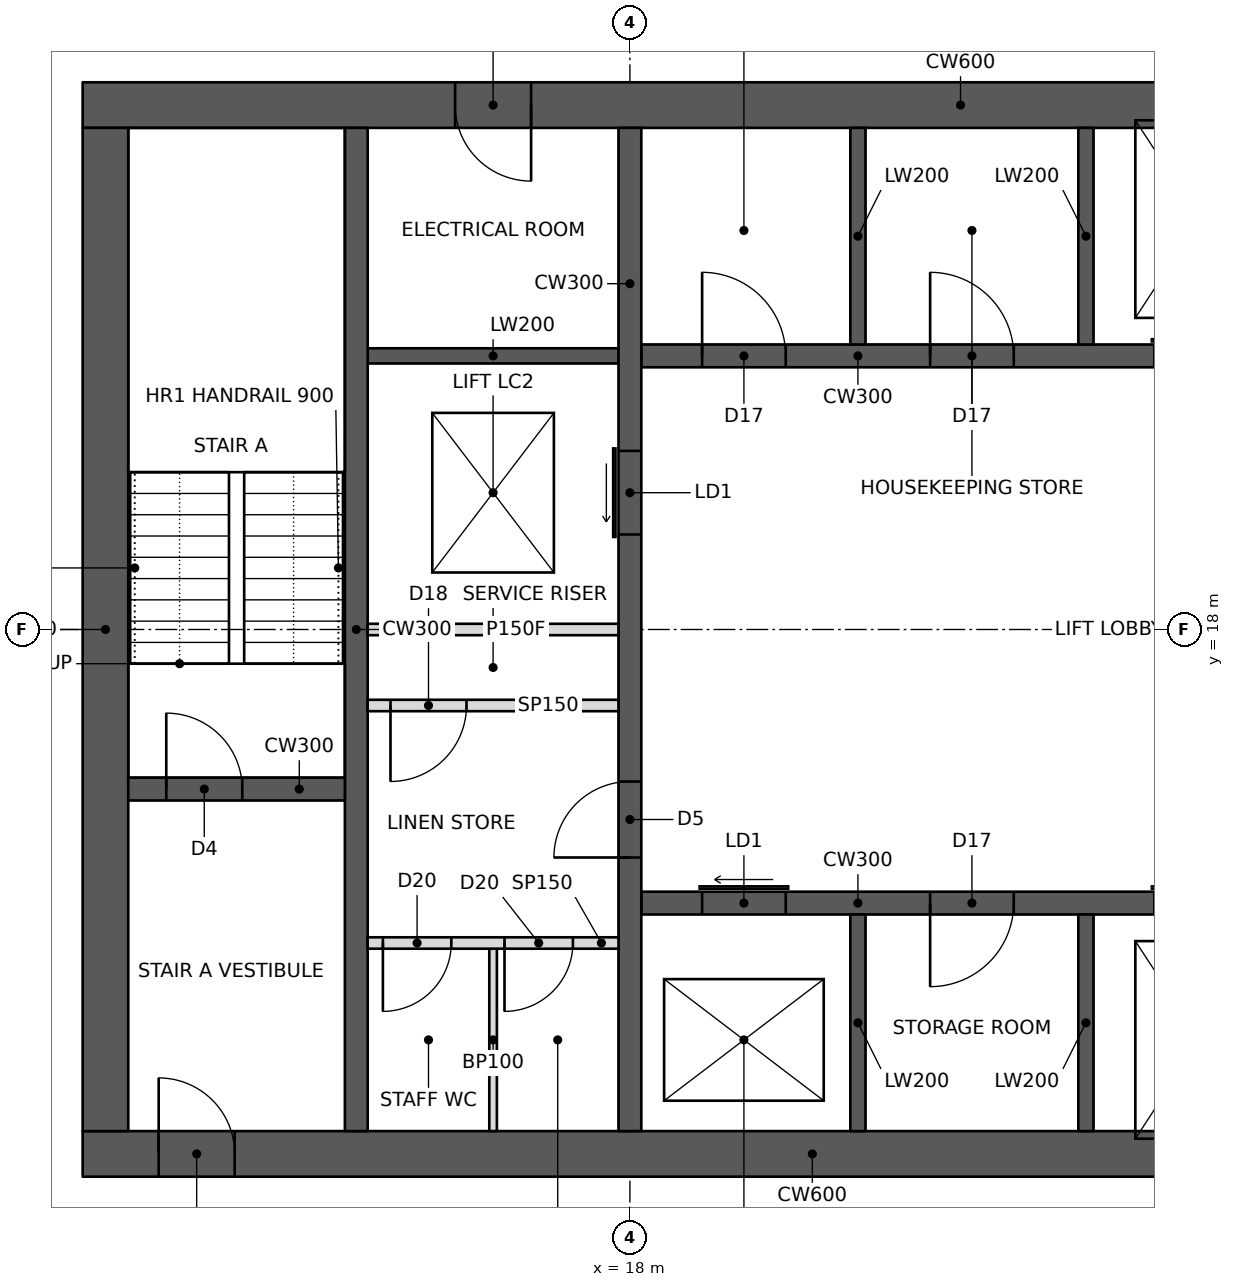
"""IFC4 building model, lengths in metres.
Left out: names, types, materials, properties, quantities, classifications, styles, units other than length and angle.
Written with IfcOpenShell. Run it as: python <this file> out.ifc"""

import sys

from ifc_helpers import new_model, si_unit, direction, frame, frame_2d, origin, place, context, subcontext, project, spatial, rectangle, extrude, element, fill, save


model = new_model("IFC4")
c1 = context("Model", 3, precision=1e-05, world=origin(), true_north=direction((0.0, 1.0)))
c2 = subcontext(c1, "Body", "Model", "MODEL_VIEW")
j1 = project(units=[si_unit("LENGTHUNIT", "METRE"), si_unit("PLANEANGLEUNIT", "RADIAN")], contexts=[c1])
p1 = place(None, origin())
s1 = spatial("IfcSite", under=j1, at=p1, CompositionType="ELEMENT")
p2 = place(p1, origin())
s2 = spatial("IfcBuilding", under=s1, at=p2, CompositionType="ELEMENT")
p3 = place(p2, frame((0.0, 0.0, 208.0)))
s3 = spatial("IfcBuildingStorey", under=s2, at=p3, CompositionType="ELEMENT", Elevation=208.0)
p4 = place(p3, frame((10.8, 11.1, 0.0), z_axis=(0.0, 0.0, 1.0), x_axis=(1.0, 0.0, 0.0)))
e1 = element("IfcWall", 1, at=p4, inside=s3, PredefinedType="SHEAR", context=c2, shape_type="SweptSolid", body=[
    extrude(rectangle(XDim=23.4, YDim=0.6, at=frame_2d((11.7, 0.0))), origin(), (0.0, 0.0, 1.0), 3.4),
])
p5 = place(p4, frame((1.0, 0.0, 0.0)))
e2 = element("IfcOpeningElement", 2, at=p5, cuts=e1, PredefinedType="OPENING", context=c2, shape_type="SweptSolid", body=[
    extrude(rectangle(XDim=1.0, YDim=2.1, at=frame_2d((0.5, 1.05))), frame((0.0, 0.31, 0.0), z_axis=(0.0, -1.0, 0.0), x_axis=(1.0, 0.0, 0.0)), (0.0, 0.0, 1.0), 0.62),
])
p6 = place(p4, frame((17.2, 0.0, 0.0)))
e3 = element("IfcOpeningElement", 3, at=p6, cuts=e1, PredefinedType="OPENING", context=c2, shape_type="SweptSolid", body=[
    extrude(rectangle(XDim=1.8, YDim=2.1, at=frame_2d((0.9, 1.05))), frame((0.0, 0.31, 0.0), z_axis=(0.0, -1.0, 0.0), x_axis=(1.0, 0.0, 0.0)), (0.0, 0.0, 1.0), 0.62),
])
p7 = place(p3, frame((10.8, 24.9, 0.0), z_axis=(0.0, 0.0, 1.0), x_axis=(1.0, 0.0, 0.0)))
e4 = element("IfcWall", 4, at=p7, inside=s3, PredefinedType="SHEAR", context=c2, shape_type="SweptSolid", body=[
    extrude(rectangle(XDim=23.4, YDim=0.6, at=frame_2d((11.7, 0.0))), origin(), (0.0, 0.0, 1.0), 3.4),
])
p8 = place(p7, frame((17.2, 0.0, 0.0)))
e5 = element("IfcOpeningElement", 5, at=p8, cuts=e4, PredefinedType="OPENING", context=c2, shape_type="SweptSolid", body=[
    extrude(rectangle(XDim=1.8, YDim=2.1, at=frame_2d((0.9, 1.05))), frame((0.0, 0.31, 0.0), z_axis=(0.0, -1.0, 0.0), x_axis=(1.0, 0.0, 0.0)), (0.0, 0.0, 1.0), 0.62),
])
p9 = place(p7, frame((21.1, 0.0, 0.0)))
e6 = element("IfcOpeningElement", 6, at=p9, cuts=e4, PredefinedType="OPENING", context=c2, shape_type="SweptSolid", body=[
    extrude(rectangle(XDim=1.0, YDim=2.1, at=frame_2d((0.5, 1.05))), frame((0.0, 0.31, 0.0), z_axis=(0.0, -1.0, 0.0), x_axis=(1.0, 0.0, 0.0)), (0.0, 0.0, 1.0), 0.62),
])
p10 = place(p7, frame((4.9, 0.0, 0.0)))
e7 = element("IfcOpeningElement", 7, at=p10, cuts=e4, PredefinedType="OPENING", context=c2, shape_type="SweptSolid", body=[
    extrude(rectangle(XDim=1.0, YDim=2.1, at=frame_2d((0.5, 1.05))), frame((0.0, 0.31, 0.0), z_axis=(0.0, -1.0, 0.0), x_axis=(1.0, 0.0, 0.0)), (0.0, 0.0, 1.0), 0.62),
])
p11 = place(p3, frame((11.1, 11.4, 0.0), z_axis=(0.0, 0.0, 1.0), x_axis=(0.0, 1.0, 0.0)))
e8 = element("IfcWall", 8, at=p11, inside=s3, PredefinedType="SHEAR", context=c2, shape_type="SweptSolid", body=[
    extrude(rectangle(XDim=13.2, YDim=0.6, at=frame_2d((6.6, 0.0))), origin(), (0.0, 0.0, 1.0), 3.4),
])
p12 = place(p3, frame((14.4, 11.4, 0.0), z_axis=(0.0, 0.0, 1.0), x_axis=(0.0, 1.0, 0.0)))
e9 = element("IfcWall", 9, at=p12, inside=s3, PredefinedType="SHEAR", context=c2, shape_type="SweptSolid", body=[
    extrude(rectangle(XDim=13.2, YDim=0.3, at=frame_2d((6.6, 0.0))), origin(), (0.0, 0.0, 1.0), 3.4),
])
p13 = place(p3, frame((11.4, 15.9, 0.0), z_axis=(0.0, 0.0, 1.0), x_axis=(1.0, 0.0, 0.0)))
e10 = element("IfcWall", 10, at=p13, inside=s3, PredefinedType="SHEAR", context=c2, shape_type="SweptSolid", body=[
    extrude(rectangle(XDim=2.85, YDim=0.3, at=frame_2d((1.425, 0.0))), origin(), (0.0, 0.0, 1.0), 3.4),
])
p14 = place(p13, frame((0.5, 0.0, 0.0)))
e11 = element("IfcOpeningElement", 11, at=p14, cuts=e10, PredefinedType="OPENING", context=c2, shape_type="SweptSolid", body=[
    extrude(rectangle(XDim=1.0, YDim=2.1, at=frame_2d((0.5, 1.05))), frame((0.0, 0.16, 0.0), z_axis=(0.0, -1.0, 0.0), x_axis=(1.0, 0.0, 0.0)), (0.0, 0.0, 1.0), 0.32),
])
p15 = place(p3, frame((18.0, 11.4, 0.0), z_axis=(0.0, 0.0, 1.0), x_axis=(0.0, 1.0, 0.0)))
e12 = element("IfcWall", 12, at=p15, inside=s3, PredefinedType="SHEAR", context=c2, shape_type="SweptSolid", body=[
    extrude(rectangle(XDim=13.2, YDim=0.3, at=frame_2d((6.6, 0.0))), origin(), (0.0, 0.0, 1.0), 3.4),
])
p16 = place(p15, frame((3.6, 0.0, 0.0)))
e13 = element("IfcOpeningElement", 13, at=p16, cuts=e12, PredefinedType="OPENING", context=c2, shape_type="SweptSolid", body=[
    extrude(rectangle(XDim=1.0, YDim=2.1, at=frame_2d((0.5, 1.05))), frame((0.0, 0.16, 0.0), z_axis=(0.0, -1.0, 0.0), x_axis=(1.0, 0.0, 0.0)), (0.0, 0.0, 1.0), 0.32),
])
p17 = place(p15, frame((7.85, 0.0, 0.0)))
e14 = element("IfcOpeningElement", 14, at=p17, cuts=e12, PredefinedType="OPENING", context=c2, shape_type="SweptSolid", body=[
    extrude(rectangle(XDim=1.1, YDim=2.1, at=frame_2d((0.55, 1.05))), frame((0.0, 0.16, 0.0), z_axis=(0.0, -1.0, 0.0), x_axis=(1.0, 0.0, 0.0)), (0.0, 0.0, 1.0), 0.32),
])
p18 = place(p3, frame((14.55, 18.0, 0.0), z_axis=(0.0, 0.0, 1.0), x_axis=(1.0, 0.0, 0.0)))
e15 = element("IfcWall", 15, at=p18, inside=s3, PredefinedType="PARTITIONING", context=c2, shape_type="SweptSolid", body=[
    extrude(rectangle(XDim=3.3, YDim=0.15, at=frame_2d((1.65, 0.0))), origin(), (0.0, 0.0, 1.0), 3.2),
])
p19 = place(p3, frame((18.15, 14.4, 0.0), z_axis=(0.0, 0.0, 1.0), x_axis=(1.0, 0.0, 0.0)))
e16 = element("IfcWall", 16, at=p19, inside=s3, PredefinedType="SHEAR", context=c2, shape_type="SweptSolid", body=[
    extrude(rectangle(XDim=9.0, YDim=0.3, at=frame_2d((4.5, 0.0))), origin(), (0.0, 0.0, 1.0), 3.4),
])
p20 = place(p19, frame((0.8, 0.0, 0.0)))
e17 = element("IfcOpeningElement", 17, at=p20, cuts=e16, PredefinedType="OPENING", context=c2, shape_type="SweptSolid", body=[
    extrude(rectangle(XDim=1.1, YDim=2.1, at=frame_2d((0.55, 1.05))), frame((0.0, 0.16, 0.0), z_axis=(0.0, -1.0, 0.0), x_axis=(1.0, 0.0, 0.0)), (0.0, 0.0, 1.0), 0.32),
])
p21 = place(p19, frame((6.75, 0.0, 0.0)))
e18 = element("IfcOpeningElement", 18, at=p21, cuts=e16, PredefinedType="OPENING", context=c2, shape_type="SweptSolid", body=[
    extrude(rectangle(XDim=1.2, YDim=2.1, at=frame_2d((0.6, 1.05))), frame((0.0, 0.16, 0.0), z_axis=(0.0, -1.0, 0.0), x_axis=(1.0, 0.0, 0.0)), (0.0, 0.0, 1.0), 0.32),
])
p22 = place(p19, frame((3.8, 0.0, 0.0)))
e19 = element("IfcOpeningElement", 19, at=p22, cuts=e16, PredefinedType="OPENING", context=c2, shape_type="SweptSolid", body=[
    extrude(rectangle(XDim=1.1, YDim=2.1, at=frame_2d((0.55, 1.05))), frame((0.0, 0.16, 0.0), z_axis=(0.0, -1.0, 0.0), x_axis=(1.0, 0.0, 0.0)), (0.0, 0.0, 1.0), 0.32),
])
for number, where, z_axis, x_axis in (
    (20, (21.0, 11.4, 0.0), (0.0, 0.0, 1.0), (0.0, 1.0, 0.0)),
    (21, (24.0, 11.4, 0.0), (0.0, 0.0, 1.0), (0.0, 1.0, 0.0)),
):
    element("IfcWall", number, at=place(p3, frame(where, z_axis=z_axis, x_axis=x_axis)), inside=s3, PredefinedType="SHEAR", context=c2, shape_type="SweptSolid", body=[
        extrude(rectangle(XDim=2.85, YDim=0.2, at=frame_2d((1.425, 0.0))), origin(), (0.0, 0.0, 1.0), 3.4),
    ])
p23 = place(p3, frame((18.15, 21.6, 0.0), z_axis=(0.0, 0.0, 1.0), x_axis=(1.0, 0.0, 0.0)))
e22 = element("IfcWall", 22, at=p23, inside=s3, PredefinedType="SHEAR", context=c2, shape_type="SweptSolid", body=[
    extrude(rectangle(XDim=9.0, YDim=0.3, at=frame_2d((4.5, 0.0))), origin(), (0.0, 0.0, 1.0), 3.4),
])
p24 = place(p23, frame((6.75, 0.0, 0.0)))
e23 = element("IfcOpeningElement", 23, at=p24, cuts=e22, PredefinedType="OPENING", context=c2, shape_type="SweptSolid", body=[
    extrude(rectangle(XDim=1.2, YDim=2.1, at=frame_2d((0.6, 1.05))), frame((0.0, 0.16, 0.0), z_axis=(0.0, -1.0, 0.0), x_axis=(1.0, 0.0, 0.0)), (0.0, 0.0, 1.0), 0.32),
])
p25 = place(p23, frame((0.8, 0.0, 0.0)))
e24 = element("IfcOpeningElement", 24, at=p25, cuts=e22, PredefinedType="OPENING", context=c2, shape_type="SweptSolid", body=[
    extrude(rectangle(XDim=1.1, YDim=2.1, at=frame_2d((0.55, 1.05))), frame((0.0, 0.16, 0.0), z_axis=(0.0, -1.0, 0.0), x_axis=(1.0, 0.0, 0.0)), (0.0, 0.0, 1.0), 0.32),
])
p26 = place(p23, frame((3.8, 0.0, 0.0)))
e25 = element("IfcOpeningElement", 25, at=p26, cuts=e22, PredefinedType="OPENING", context=c2, shape_type="SweptSolid", body=[
    extrude(rectangle(XDim=1.1, YDim=2.1, at=frame_2d((0.55, 1.05))), frame((0.0, 0.16, 0.0), z_axis=(0.0, -1.0, 0.0), x_axis=(1.0, 0.0, 0.0)), (0.0, 0.0, 1.0), 0.32),
])
for number, where, z_axis, x_axis in (
    (26, (21.0, 21.75, 0.0), (0.0, 0.0, 1.0), (0.0, 1.0, 0.0)),
    (27, (24.0, 21.75, 0.0), (0.0, 0.0, 1.0), (0.0, 1.0, 0.0)),
):
    element("IfcWall", number, at=place(p3, frame(where, z_axis=z_axis, x_axis=x_axis)), inside=s3, PredefinedType="SHEAR", context=c2, shape_type="SweptSolid", body=[
        extrude(rectangle(XDim=2.85, YDim=0.2, at=frame_2d((1.425, 0.0))), origin(), (0.0, 0.0, 1.0), 3.4),
    ])
p27 = place(p3, frame((14.55, 21.6, 0.0), z_axis=(0.0, 0.0, 1.0), x_axis=(1.0, 0.0, 0.0)))
e28 = element("IfcWall", 28, at=p27, inside=s3, PredefinedType="SHEAR", context=c2, shape_type="SweptSolid", body=[
    extrude(rectangle(XDim=3.3, YDim=0.2, at=frame_2d((1.65, 0.0))), origin(), (0.0, 0.0, 1.0), 3.4),
])
p28 = place(p3, frame((14.55, 17.0, 0.0), z_axis=(0.0, 0.0, 1.0), x_axis=(1.0, 0.0, 0.0)))
e29 = element("IfcWall", 29, at=p28, inside=s3, PredefinedType="PARTITIONING", context=c2, shape_type="SweptSolid", body=[
    extrude(rectangle(XDim=3.3, YDim=0.15, at=frame_2d((1.65, 0.0))), origin(), (0.0, 0.0, 1.0), 3.2),
])
p29 = place(p28, frame((0.3, 0.0, 0.0)))
e30 = element("IfcOpeningElement", 30, at=p29, cuts=e29, PredefinedType="OPENING", context=c2, shape_type="SweptSolid", body=[
    extrude(rectangle(XDim=1.0, YDim=2.1, at=frame_2d((0.5, 1.05))), frame((0.0, 0.085, 0.0), z_axis=(0.0, -1.0, 0.0), x_axis=(1.0, 0.0, 0.0)), (0.0, 0.0, 1.0), 0.17),
])
p30 = place(p3, frame((14.55, 13.875, 0.0), z_axis=(0.0, 0.0, 1.0), x_axis=(1.0, 0.0, 0.0)))
e31 = element("IfcWall", 31, at=p30, inside=s3, PredefinedType="PARTITIONING", context=c2, shape_type="SweptSolid", body=[
    extrude(rectangle(XDim=3.3, YDim=0.15, at=frame_2d((1.65, 0.0))), origin(), (0.0, 0.0, 1.0), 3.2),
])
p31 = place(p30, frame((0.2, 0.0, 0.0)))
e32 = element("IfcOpeningElement", 32, at=p31, cuts=e31, PredefinedType="OPENING", context=c2, shape_type="SweptSolid", body=[
    extrude(rectangle(XDim=0.9, YDim=2.1, at=frame_2d((0.45, 1.05))), frame((0.0, 0.085, 0.0), z_axis=(0.0, -1.0, 0.0), x_axis=(1.0, 0.0, 0.0)), (0.0, 0.0, 1.0), 0.17),
])
p32 = place(p30, frame((1.8, 0.0, 0.0)))
e33 = element("IfcOpeningElement", 33, at=p32, cuts=e31, PredefinedType="OPENING", context=c2, shape_type="SweptSolid", body=[
    extrude(rectangle(XDim=0.9, YDim=2.1, at=frame_2d((0.45, 1.05))), frame((0.0, 0.085, 0.0), z_axis=(0.0, -1.0, 0.0), x_axis=(1.0, 0.0, 0.0)), (0.0, 0.0, 1.0), 0.17),
])
p33 = place(p3, frame((16.2, 11.4, 0.0), z_axis=(0.0, 0.0, 1.0), x_axis=(0.0, 1.0, 0.0)))
e34 = element("IfcWall", 34, at=p33, inside=s3, PredefinedType="PARTITIONING", context=c2, shape_type="SweptSolid", body=[
    extrude(rectangle(XDim=2.4, YDim=0.1, at=frame_2d((1.2, 0.0))), origin(), (0.0, 0.0, 1.0), 3.2),
])
p34 = place(p29, frame((1.0, 0.0, 0.0), z_axis=(0.0, 0.0, 1.0), x_axis=(-1.0, 0.0, 0.0)))
e35 = element("IfcDoor", 35, at=p34, inside=s3, OperationType="SINGLE_SWING_RIGHT", PredefinedType="DOOR", context=c2, shape_type="SweptSolid", body=[
    extrude(rectangle(XDim=1.0, YDim=2.1, at=frame_2d((0.5, 1.05))), frame((0.0, 0.025, 0.0), z_axis=(0.0, -1.0, 0.0), x_axis=(1.0, 0.0, 0.0)), (0.0, 0.0, 1.0), 0.05),
])
fill(e30, e35)
p35 = place(p31, frame((0.9, 0.0, 0.0), z_axis=(0.0, 0.0, 1.0), x_axis=(-1.0, 0.0, 0.0)))
e36 = element("IfcDoor", 36, at=p35, inside=s3, OperationType="SINGLE_SWING_RIGHT", PredefinedType="DOOR", context=c2, shape_type="SweptSolid", body=[
    extrude(rectangle(XDim=0.9, YDim=2.1, at=frame_2d((0.45, 1.05))), frame((0.0, 0.025, 0.0), z_axis=(0.0, -1.0, 0.0), x_axis=(1.0, 0.0, 0.0)), (0.0, 0.0, 1.0), 0.05),
])
fill(e32, e36)
p36 = place(p32, frame((0.9, 0.0, 0.0), z_axis=(0.0, 0.0, 1.0), x_axis=(-1.0, 0.0, 0.0)))
e37 = element("IfcDoor", 37, at=p36, inside=s3, OperationType="SINGLE_SWING_RIGHT", PredefinedType="DOOR", context=c2, shape_type="SweptSolid", body=[
    extrude(rectangle(XDim=0.9, YDim=2.1, at=frame_2d((0.45, 1.05))), frame((0.0, 0.025, 0.0), z_axis=(0.0, -1.0, 0.0), x_axis=(1.0, 0.0, 0.0)), (0.0, 0.0, 1.0), 0.05),
])
fill(e33, e37)
p37 = place(p5, origin())
e38 = element("IfcDoor", 38, at=p37, inside=s3, OperationType="SINGLE_SWING_LEFT", PredefinedType="DOOR", context=c2, shape_type="SweptSolid", body=[
    extrude(rectangle(XDim=1.0, YDim=2.1, at=frame_2d((0.5, 1.05))), frame((0.0, 0.025, 0.0), z_axis=(0.0, -1.0, 0.0), x_axis=(1.0, 0.0, 0.0)), (0.0, 0.0, 1.0), 0.05),
])
fill(e2, e38)
p38 = place(p14, origin())
e39 = element("IfcDoor", 39, at=p38, inside=s3, OperationType="SINGLE_SWING_LEFT", PredefinedType="DOOR", context=c2, shape_type="SweptSolid", body=[
    extrude(rectangle(XDim=1.0, YDim=2.1, at=frame_2d((0.5, 1.05))), frame((0.0, 0.025, 0.0), z_axis=(0.0, -1.0, 0.0), x_axis=(1.0, 0.0, 0.0)), (0.0, 0.0, 1.0), 0.05),
])
fill(e11, e39)
p39 = place(p16, origin())
e40 = element("IfcDoor", 40, at=p39, inside=s3, OperationType="SINGLE_SWING_LEFT", PredefinedType="DOOR", context=c2, shape_type="SweptSolid", body=[
    extrude(rectangle(XDim=1.0, YDim=2.1, at=frame_2d((0.5, 1.05))), frame((0.0, 0.025, 0.0), z_axis=(0.0, -1.0, 0.0), x_axis=(1.0, 0.0, 0.0)), (0.0, 0.0, 1.0), 0.05),
])
fill(e13, e40)
p40 = place(p10, frame((1.0, 0.0, 0.0), z_axis=(0.0, 0.0, 1.0), x_axis=(-1.0, 0.0, 0.0)))
e41 = element("IfcDoor", 41, at=p40, inside=s3, OperationType="SINGLE_SWING_LEFT", PredefinedType="DOOR", context=c2, shape_type="SweptSolid", body=[
    extrude(rectangle(XDim=1.0, YDim=2.1, at=frame_2d((0.5, 1.05))), frame((0.0, 0.025, 0.0), z_axis=(0.0, -1.0, 0.0), x_axis=(1.0, 0.0, 0.0)), (0.0, 0.0, 1.0), 0.05),
])
fill(e7, e41)
p41 = place(p20, origin())
e42 = element("IfcDoor", 42, at=p41, inside=s3, OperationType="SLIDING_TO_LEFT", PredefinedType="DOOR", context=c2, shape_type="SweptSolid", body=[
    extrude(rectangle(XDim=1.1, YDim=2.1, at=frame_2d((0.55, 1.05))), frame((0.0, 0.025, 0.0), z_axis=(0.0, -1.0, 0.0), x_axis=(1.0, 0.0, 0.0)), (0.0, 0.0, 1.0), 0.05),
])
fill(e17, e42)
p42 = place(p17, origin())
e43 = element("IfcDoor", 43, at=p42, inside=s3, OperationType="SLIDING_TO_LEFT", PredefinedType="DOOR", context=c2, shape_type="SweptSolid", body=[
    extrude(rectangle(XDim=1.1, YDim=2.1, at=frame_2d((0.55, 1.05))), frame((0.0, 0.025, 0.0), z_axis=(0.0, -1.0, 0.0), x_axis=(1.0, 0.0, 0.0)), (0.0, 0.0, 1.0), 0.05),
])
fill(e14, e43)
p43 = place(p25, origin())
e44 = element("IfcDoor", 44, at=p43, inside=s3, OperationType="SINGLE_SWING_LEFT", PredefinedType="DOOR", context=c2, shape_type="SweptSolid", body=[
    extrude(rectangle(XDim=1.1, YDim=2.1, at=frame_2d((0.55, 1.05))), frame((0.0, 0.025, 0.0), z_axis=(0.0, -1.0, 0.0), x_axis=(1.0, 0.0, 0.0)), (0.0, 0.0, 1.0), 0.05),
])
fill(e24, e44)
p44 = place(p26, origin())
e45 = element("IfcDoor", 45, at=p44, inside=s3, OperationType="SINGLE_SWING_LEFT", PredefinedType="DOOR", context=c2, shape_type="SweptSolid", body=[
    extrude(rectangle(XDim=1.1, YDim=2.1, at=frame_2d((0.55, 1.05))), frame((0.0, 0.025, 0.0), z_axis=(0.0, -1.0, 0.0), x_axis=(1.0, 0.0, 0.0)), (0.0, 0.0, 1.0), 0.05),
])
fill(e25, e45)
p45 = place(p22, frame((1.1, 0.0, 0.0), z_axis=(0.0, 0.0, 1.0), x_axis=(-1.0, 0.0, 0.0)))
e46 = element("IfcDoor", 46, at=p45, inside=s3, OperationType="SINGLE_SWING_RIGHT", PredefinedType="DOOR", context=c2, shape_type="SweptSolid", body=[
    extrude(rectangle(XDim=1.1, YDim=2.1, at=frame_2d((0.55, 1.05))), frame((0.0, 0.025, 0.0), z_axis=(0.0, -1.0, 0.0), x_axis=(1.0, 0.0, 0.0)), (0.0, 0.0, 1.0), 0.05),
])
fill(e19, e46)
save(model, sys.argv[1])
